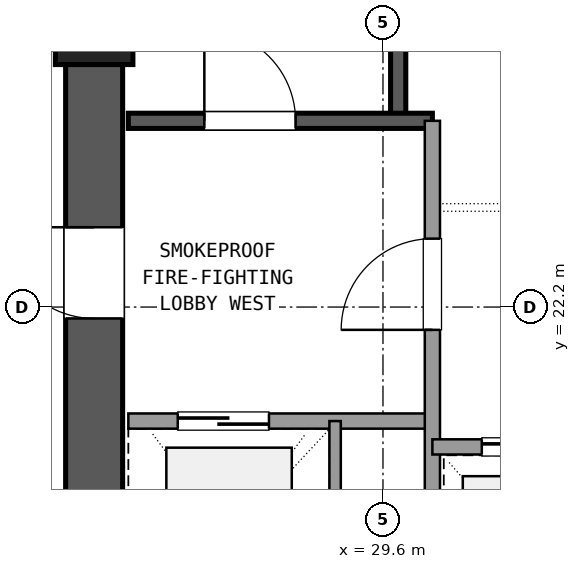
"""IFC4 building model, lengths in metres.
Left out: names, types, materials, properties, quantities, classifications, styles, units other than length and angle.
Written with IfcOpenShell. Run it as: python <this file> out.ifc"""

import sys

from ifc_helpers import new_model, si_unit, direction, frame, frame_2d, origin, origin_2d, place, context, subcontext, project, spatial, rectangle, extrude, element, fill, save


model = new_model("IFC4")
c1 = context("Model", 3, precision=1e-05, world=origin(), true_north=direction((0.0, 1.0)))
c2 = subcontext(c1, "Body", "Model", "MODEL_VIEW")
j1 = project(units=[si_unit("LENGTHUNIT", "METRE"), si_unit("PLANEANGLEUNIT", "RADIAN")], contexts=[c1])
p1 = place(None, origin())
s1 = spatial("IfcSite", under=j1, at=p1, CompositionType="ELEMENT")
p2 = place(p1, origin())
s2 = spatial("IfcBuilding", under=s1, at=p2, CompositionType="ELEMENT")
p3 = place(p2, frame((0.0, 0.0, 75.42)))
s3 = spatial("IfcBuildingStorey", under=s2, at=p3, CompositionType="ELEMENT", Elevation=75.42)
p4 = place(p3, frame((25.8, 25.9, 0.0), z_axis=(0.0, 0.0, 1.0), x_axis=(1.0, 0.0, 0.0)))
e1 = element("IfcColumn", 1, at=p4, inside=s3, PredefinedType="COLUMN", context=c2, shape_type="SweptSolid", body=[
    extrude(rectangle(XDim=1.02, YDim=1.02, at=origin_2d()), origin(), (0.0, 0.0, 1.0), 5.76),
])
p5 = place(p3, frame((25.8, 25.395, 0.0), z_axis=(0.0, 0.0, 1.0), x_axis=(0.0, -1.0, 0.0)))
e2 = element("IfcWall", 2, at=p5, inside=s3, PredefinedType="SHEAR", context=c2, shape_type="SweptSolid", body=[
    extrude(rectangle(XDim=7.59, YDim=0.75, at=frame_2d((3.795, 0.0))), origin(), (0.0, 0.0, 1.0), 5.48),
])
p6 = place(p5, frame((2.145, 0.0, 0.0)))
e3 = element("IfcOpeningElement", 3, at=p6, cuts=e2, PredefinedType="OPENING", context=c2, shape_type="SweptSolid", body=[
    extrude(rectangle(XDim=1.2, YDim=2.15, at=frame_2d((0.6, 1.075))), frame((0.0, 0.385, 0.0), z_axis=(0.0, -1.0, 0.0), x_axis=(1.0, 0.0, 0.0)), (0.0, 0.0, 1.0), 0.77),
])
p7 = place(p3, frame((29.8, 24.65, 0.0), z_axis=(0.0, 0.0, 1.0), x_axis=(0.0, 1.0, 0.0)))
e4 = element("IfcWall", 4, at=p7, inside=s3, PredefinedType="SHEAR", context=c2, shape_type="SweptSolid", body=[
    extrude(rectangle(XDim=9.4, YDim=0.2, at=frame_2d((4.7, 0.0))), origin(), (0.0, 0.0, 1.0), 5.48),
])
p8 = place(p3, frame((26.25, 24.65, 0.0), z_axis=(0.0, 0.0, 1.0), x_axis=(1.0, 0.0, 0.0)))
e5 = element("IfcWall", 5, at=p8, inside=s3, PredefinedType="SHEAR", context=c2, shape_type="SweptSolid", body=[
    extrude(rectangle(XDim=4.0, YDim=0.2, at=frame_2d((2.0, 0.0))), origin(), (0.0, 0.0, 1.0), 5.48),
])
p9 = place(p8, frame((1.0, 0.0, 0.0)))
e6 = element("IfcOpeningElement", 6, at=p9, cuts=e5, PredefinedType="OPENING", context=c2, shape_type="SweptSolid", body=[
    extrude(rectangle(XDim=1.2, YDim=2.15, at=frame_2d((0.6, 1.075))), frame((0.0, 0.11, 0.0), z_axis=(0.0, -1.0, 0.0), x_axis=(1.0, 0.0, 0.0)), (0.0, 0.0, 1.0), 0.22),
])
p10 = place(p3, frame((26.25, 20.7, 0.0), z_axis=(0.0, 0.0, 1.0), x_axis=(1.0, 0.0, 0.0)))
e7 = element("IfcWall", 7, at=p10, inside=s3, PredefinedType="SOLIDWALL", context=c2, shape_type="SweptSolid", body=[
    extrude(rectangle(XDim=4.0, YDim=0.2, at=frame_2d((2.0, 0.0))), origin(), (0.0, 0.0, 1.0), 4.77),
])
p11 = place(p10, frame((0.65, 0.0, 0.0)))
e8 = element("IfcOpeningElement", 8, at=p11, cuts=e7, PredefinedType="OPENING", context=c2, shape_type="SweptSolid", body=[
    extrude(rectangle(XDim=1.2, YDim=2.15, at=frame_2d((0.6, 1.075))), frame((0.0, 0.11, 0.0), z_axis=(0.0, -1.0, 0.0), x_axis=(1.0, 0.0, 0.0)), (0.0, 0.0, 1.0), 0.22),
])
p12 = place(p3, frame((30.25, 17.75, 0.0), z_axis=(0.0, 0.0, 1.0), x_axis=(0.0, 1.0, 0.0)))
e9 = element("IfcWall", 9, at=p12, inside=s3, PredefinedType="SOLIDWALL", context=c2, shape_type="SweptSolid", body=[
    extrude(rectangle(XDim=6.9, YDim=0.2, at=frame_2d((3.45, 0.0))), origin(), (0.0, 0.0, 1.0), 4.77),
])
p13 = place(p12, frame((4.15, 0.0, 0.0)))
e10 = element("IfcOpeningElement", 10, at=p13, cuts=e9, PredefinedType="OPENING", context=c2, shape_type="SweptSolid", body=[
    extrude(rectangle(XDim=1.2, YDim=2.15, at=frame_2d((0.6, 1.075))), frame((0.0, 0.11, 0.0), z_axis=(0.0, -1.0, 0.0), x_axis=(1.0, 0.0, 0.0)), (0.0, 0.0, 1.0), 0.22),
])
p14 = place(p3, frame((28.97, 17.75, 0.0), z_axis=(0.0, 0.0, 1.0), x_axis=(0.0, 1.0, 0.0)))
e11 = element("IfcWall", 11, at=p14, inside=s3, PredefinedType="PARTITIONING", context=c2, shape_type="SweptSolid", body=[
    extrude(rectangle(XDim=2.95, YDim=0.15, at=frame_2d((1.475, 0.0))), origin(), (0.0, 0.0, 1.0), 4.77),
])
p15 = place(p3, frame((30.25, 20.36, 0.0), z_axis=(0.0, 0.0, 1.0), x_axis=(1.0, 0.0, 0.0)))
e12 = element("IfcWall", 12, at=p15, inside=s3, PredefinedType="SOLIDWALL", context=c2, shape_type="SweptSolid", body=[
    extrude(rectangle(XDim=7.0, YDim=0.2, at=frame_2d((3.5, 0.0))), origin(), (0.0, 0.0, 1.0), 4.77),
])
p16 = place(p15, frame((0.65, 0.0, 0.0)))
e13 = element("IfcOpeningElement", 13, at=p16, cuts=e12, PredefinedType="OPENING", context=c2, shape_type="SweptSolid", body=[
    extrude(rectangle(XDim=1.1, YDim=2.15, at=frame_2d((0.55, 1.075))), frame((0.0, 0.11, 0.0), z_axis=(0.0, -1.0, 0.0), x_axis=(1.0, 0.0, 0.0)), (0.0, 0.0, 1.0), 0.22),
])
p17 = place(p15, frame((2.95, 0.0, 0.0)))
e14 = element("IfcOpeningElement", 14, at=p17, cuts=e12, PredefinedType="OPENING", context=c2, shape_type="SweptSolid", body=[
    extrude(rectangle(XDim=1.1, YDim=2.15, at=frame_2d((0.55, 1.075))), frame((0.0, 0.11, 0.0), z_axis=(0.0, -1.0, 0.0), x_axis=(1.0, 0.0, 0.0)), (0.0, 0.0, 1.0), 0.22),
])
p18 = place(p15, frame((5.25, 0.0, 0.0)))
e15 = element("IfcOpeningElement", 15, at=p18, cuts=e12, PredefinedType="OPENING", context=c2, shape_type="SweptSolid", body=[
    extrude(rectangle(XDim=1.1, YDim=2.15, at=frame_2d((0.55, 1.075))), frame((0.0, 0.11, 0.0), z_axis=(0.0, -1.0, 0.0), x_axis=(1.0, 0.0, 0.0)), (0.0, 0.0, 1.0), 0.22),
])
p19 = place(p9, origin())
e16 = element("IfcDoor", 16, at=p19, inside=s3, OperationType="SINGLE_SWING_LEFT", PredefinedType="DOOR", context=c2, shape_type="SweptSolid", body=[
    extrude(rectangle(XDim=1.2, YDim=2.15, at=frame_2d((0.6, 1.075))), frame((0.0, 0.025, 0.0), z_axis=(0.0, -1.0, 0.0), x_axis=(1.0, 0.0, 0.0)), (0.0, 0.0, 1.0), 0.05),
])
fill(e6, e16)
p20 = place(p11, origin())
e17 = element("IfcDoor", 17, at=p20, inside=s3, OperationType="SLIDING_TO_LEFT", PredefinedType="DOOR", context=c2, shape_type="SweptSolid", body=[
    extrude(rectangle(XDim=1.2, YDim=2.15, at=frame_2d((0.6, 1.075))), frame((0.0, 0.025, 0.0), z_axis=(0.0, -1.0, 0.0), x_axis=(1.0, 0.0, 0.0)), (0.0, 0.0, 1.0), 0.05),
])
fill(e8, e17)
p21 = place(p13, origin())
e18 = element("IfcDoor", 18, at=p21, inside=s3, OperationType="SINGLE_SWING_LEFT", PredefinedType="DOOR", context=c2, shape_type="SweptSolid", body=[
    extrude(rectangle(XDim=1.2, YDim=2.15, at=frame_2d((0.6, 1.075))), frame((0.0, 0.025, 0.0), z_axis=(0.0, -1.0, 0.0), x_axis=(1.0, 0.0, 0.0)), (0.0, 0.0, 1.0), 0.05),
])
fill(e10, e18)
p22 = place(p6, frame((1.2, 0.0, 0.0), z_axis=(0.0, 0.0, 1.0), x_axis=(-1.0, 0.0, 0.0)))
e19 = element("IfcDoor", 19, at=p22, inside=s3, OperationType="SINGLE_SWING_LEFT", PredefinedType="DOOR", context=c2, shape_type="SweptSolid", body=[
    extrude(rectangle(XDim=1.2, YDim=2.15, at=frame_2d((0.6, 1.075))), frame((0.0, 0.025, 0.0), z_axis=(0.0, -1.0, 0.0), x_axis=(1.0, 0.0, 0.0)), (0.0, 0.0, 1.0), 0.05),
])
fill(e3, e19)
p23 = place(p16, origin())
e20 = element("IfcDoor", 20, at=p23, inside=s3, OperationType="SLIDING_TO_LEFT", PredefinedType="DOOR", context=c2, shape_type="SweptSolid", body=[
    extrude(rectangle(XDim=1.1, YDim=2.15, at=frame_2d((0.55, 1.075))), frame((0.0, 0.025, 0.0), z_axis=(0.0, -1.0, 0.0), x_axis=(1.0, 0.0, 0.0)), (0.0, 0.0, 1.0), 0.05),
])
fill(e13, e20)
save(model, sys.argv[1])
